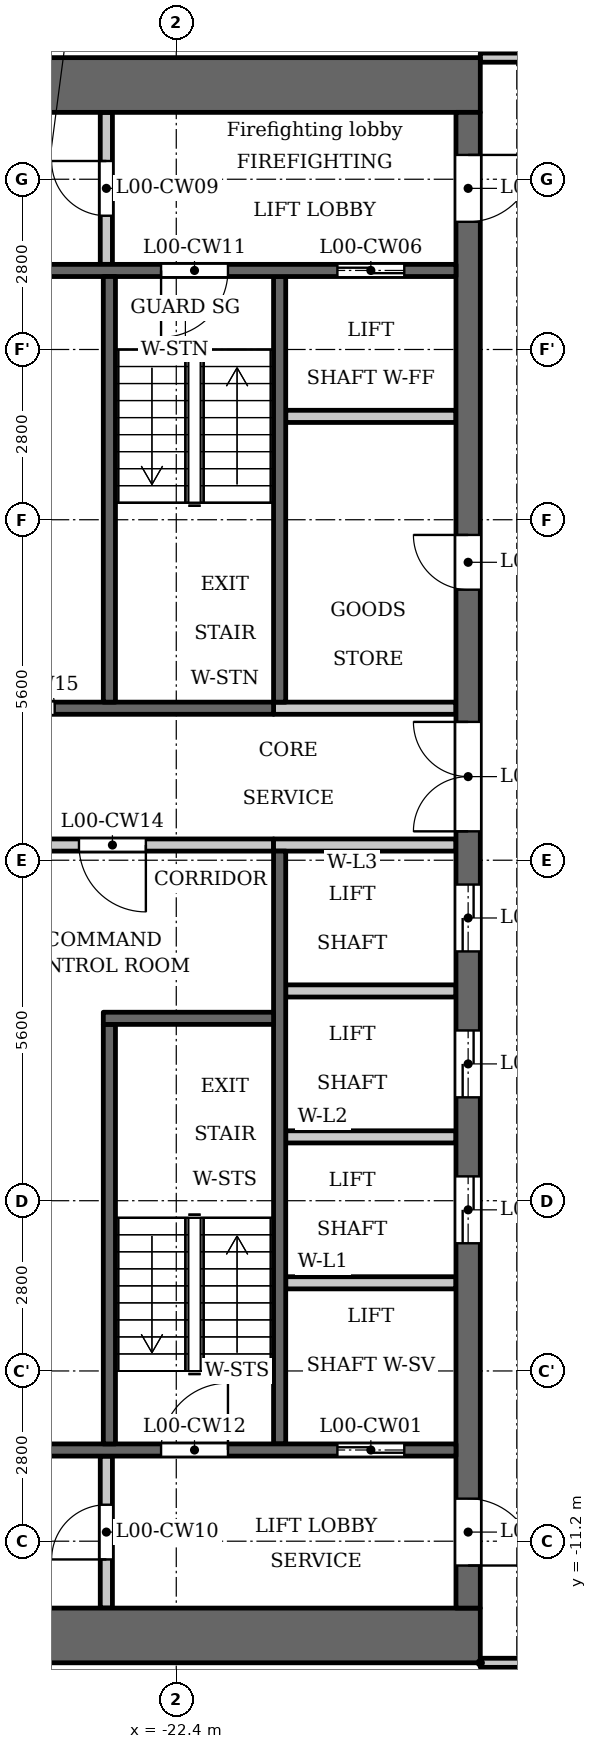
"""IFC4 building model, lengths in metres.
Left out: names, types, materials, properties, quantities, classifications, styles, units other than length and angle.
Written with IfcOpenShell. Run it as: python <this file> out.ifc"""

import sys

from ifc_helpers import new_model, si_unit, direction, frame, frame_2d, origin, place, context, subcontext, project, spatial, rectangle, extrude, element, fill, save


model = new_model("IFC4")
c1 = context("Model", 3, precision=1e-05, world=origin(), true_north=direction((0.0, 1.0)))
c2 = subcontext(c1, "Body", "Model", "MODEL_VIEW")
j1 = project(units=[si_unit("LENGTHUNIT", "METRE"), si_unit("PLANEANGLEUNIT", "RADIAN")], contexts=[c1])
p1 = place(None, origin())
s1 = spatial("IfcSite", under=j1, at=p1, CompositionType="ELEMENT")
p2 = place(p1, origin())
s2 = spatial("IfcBuilding", under=s1, at=p2, CompositionType="ELEMENT")
p3 = place(p2, origin())
s3 = spatial("IfcBuildingStorey", under=s2, at=p3, CompositionType="ELEMENT", Elevation=0.0)
p4 = place(p3, frame((-20.7, 2.6, 0.0), z_axis=(0.0, 0.0, 1.0), x_axis=(0.0, 1.0, 0.0)))
e1 = element("IfcWall", 1, at=p4, inside=s3, PredefinedType="SHEAR", context=c2, shape_type="SweptSolid", body=[
    extrude(rectangle(XDim=7.0, YDim=0.2, at=frame_2d((3.5, 0.0))), origin(), (0.0, 0.0, 1.0), 6.15),
])
p5 = place(p3, frame((-20.7, -9.6, 0.0), z_axis=(0.0, 0.0, 1.0), x_axis=(0.0, 1.0, 0.0)))
e2 = element("IfcWall", 2, at=p5, inside=s3, PredefinedType="SHEAR", context=c2, shape_type="SweptSolid", body=[
    extrude(rectangle(XDim=9.75, YDim=0.2, at=frame_2d((4.875, 0.0))), origin(), (0.0, 0.0, 1.0), 6.15),
])
p6 = place(p3, frame((-20.8, 2.5, 0.0), z_axis=(0.0, 0.0, 1.0), x_axis=(-1.0, 0.0, 0.0)))
e3 = element("IfcWall", 3, at=p6, inside=s3, PredefinedType="SHEAR", context=c2, shape_type="SweptSolid", body=[
    extrude(rectangle(XDim=5.3, YDim=0.2, at=frame_2d((2.65, 0.0))), origin(), (0.0, 0.0, 1.0), 6.15),
])
p7 = place(p6, frame((3.6, 0.0, 0.0)))
e4 = element("IfcOpeningElement", 4, at=p7, cuts=e3, PredefinedType="OPENING", context=c2, shape_type="SweptSolid", body=[
    extrude(rectangle(XDim=0.9, YDim=2.1, at=frame_2d((0.45, 1.05))), frame((0.0, 0.11, 0.0), z_axis=(0.0, -1.0, 0.0), x_axis=(1.0, 0.0, 0.0)), (0.0, 0.0, 1.0), 0.22),
])
p8 = place(p3, frame((-20.8, 0.25, 0.0), z_axis=(0.0, 0.0, 1.0), x_axis=(-1.0, 0.0, 0.0)))
e5 = element("IfcWall", 5, at=p8, inside=s3, PredefinedType="PARTITIONING", context=c2, shape_type="SweptSolid", body=[
    extrude(rectangle(XDim=5.3, YDim=0.2, at=frame_2d((2.65, 0.0))), origin(), (0.0, 0.0, 1.0), 6.15),
])
p9 = place(p8, frame((2.1, 0.0, 0.0)))
e6 = element("IfcOpeningElement", 6, at=p9, cuts=e5, PredefinedType="OPENING", context=c2, shape_type="SweptSolid", body=[
    extrude(rectangle(XDim=1.1, YDim=2.1, at=frame_2d((0.55, 1.05))), frame((0.0, 0.11, 0.0), z_axis=(0.0, -1.0, 0.0), x_axis=(1.0, 0.0, 0.0)), (0.0, 0.0, 1.0), 0.22),
])
for number, where, z_axis, x_axis in (
    (7, (-17.4, 12.75, 0.0), (0.0, 0.0, 1.0), (-1.0, 0.0, 0.0)),
    (8, (-17.4, -12.75, 0.0), (0.0, 0.0, 1.0), (-1.0, 0.0, 0.0)),
):
    element("IfcWall", number, at=place(p3, frame(where, z_axis=z_axis, x_axis=x_axis)), inside=s3, PredefinedType="SHEAR", context=c2, shape_type="SweptSolid", body=[
        extrude(rectangle(XDim=10.4, YDim=0.9, at=frame_2d((5.2, 0.0))), origin(), (0.0, 0.0, 1.0), 6.15),
    ])
p10 = place(p3, frame((-17.6, -12.3, 0.0), z_axis=(0.0, 0.0, 1.0), x_axis=(0.0, 1.0, 0.0)))
e9 = element("IfcWall", 9, at=p10, inside=s3, PredefinedType="SHEAR", context=c2, shape_type="SweptSolid", body=[
    extrude(rectangle(XDim=24.6, YDim=0.4, at=frame_2d((12.3, 0.0))), origin(), (0.0, 0.0, 1.0), 6.15),
])
p11 = place(p10, frame((6.0, 0.0, 0.0)))
e10 = element("IfcOpeningElement", 10, at=p11, cuts=e9, PredefinedType="OPENING", context=c2, shape_type="SweptSolid", body=[
    extrude(rectangle(XDim=1.1, YDim=2.1, at=frame_2d((0.55, 1.05))), frame((0.0, 0.21, 0.0), z_axis=(0.0, -1.0, 0.0), x_axis=(1.0, 0.0, 0.0)), (0.0, 0.0, 1.0), 0.42),
])
p12 = place(p10, frame((8.4, 0.0, 0.0)))
e11 = element("IfcOpeningElement", 11, at=p12, cuts=e9, PredefinedType="OPENING", context=c2, shape_type="SweptSolid", body=[
    extrude(rectangle(XDim=1.1, YDim=2.1, at=frame_2d((0.55, 1.05))), frame((0.0, 0.21, 0.0), z_axis=(0.0, -1.0, 0.0), x_axis=(1.0, 0.0, 0.0)), (0.0, 0.0, 1.0), 0.42),
])
p13 = place(p10, frame((10.8, 0.0, 0.0)))
e12 = element("IfcOpeningElement", 12, at=p13, cuts=e9, PredefinedType="OPENING", context=c2, shape_type="SweptSolid", body=[
    extrude(rectangle(XDim=1.1, YDim=2.1, at=frame_2d((0.55, 1.05))), frame((0.0, 0.21, 0.0), z_axis=(0.0, -1.0, 0.0), x_axis=(1.0, 0.0, 0.0)), (0.0, 0.0, 1.0), 0.42),
])
p14 = place(p10, frame((16.75, 0.0, 0.0)))
e13 = element("IfcOpeningElement", 13, at=p14, cuts=e9, PredefinedType="OPENING", context=c2, shape_type="SweptSolid", body=[
    extrude(rectangle(XDim=0.9, YDim=2.1, at=frame_2d((0.45, 1.05))), frame((0.0, 0.21, 0.0), z_axis=(0.0, -1.0, 0.0), x_axis=(1.0, 0.0, 0.0)), (0.0, 0.0, 1.0), 0.42),
])
p15 = place(p10, frame((22.8, 0.0, 0.0)))
e14 = element("IfcOpeningElement", 14, at=p15, cuts=e9, PredefinedType="OPENING", context=c2, shape_type="SweptSolid", body=[
    extrude(rectangle(XDim=1.1, YDim=2.1, at=frame_2d((0.55, 1.05))), frame((0.0, 0.21, 0.0), z_axis=(0.0, -1.0, 0.0), x_axis=(1.0, 0.0, 0.0)), (0.0, 0.0, 1.0), 0.42),
])
p16 = place(p10, frame((0.7, 0.0, 0.0)))
e15 = element("IfcOpeningElement", 15, at=p16, cuts=e9, PredefinedType="OPENING", context=c2, shape_type="SweptSolid", body=[
    extrude(rectangle(XDim=1.1, YDim=2.1, at=frame_2d((0.55, 1.05))), frame((0.0, 0.21, 0.0), z_axis=(0.0, -1.0, 0.0), x_axis=(1.0, 0.0, 0.0)), (0.0, 0.0, 1.0), 0.42),
])
p17 = place(p10, frame((12.775, 0.0, 0.0)))
e16 = element("IfcOpeningElement", 16, at=p17, cuts=e9, PredefinedType="OPENING", context=c2, shape_type="SweptSolid", body=[
    extrude(rectangle(XDim=1.8, YDim=2.1, at=frame_2d((0.9, 1.05))), frame((0.0, 0.21, 0.0), z_axis=(0.0, -1.0, 0.0), x_axis=(1.0, 0.0, 0.0)), (0.0, 0.0, 1.0), 0.42),
])
p18 = place(p3, frame((-23.55, 9.8, 0.0), z_axis=(0.0, 0.0, 1.0), x_axis=(0.0, 1.0, 0.0)))
e17 = element("IfcWall", 17, at=p18, inside=s3, PredefinedType="PARTITIONING", context=c2, shape_type="SweptSolid", body=[
    extrude(rectangle(XDim=2.5, YDim=0.2, at=frame_2d((1.25, 0.0))), origin(), (0.0, 0.0, 1.0), 6.15),
])
p19 = place(p18, frame((0.8, 0.0, 0.0)))
e18 = element("IfcOpeningElement", 18, at=p19, cuts=e17, PredefinedType="OPENING", context=c2, shape_type="SweptSolid", body=[
    extrude(rectangle(XDim=0.9, YDim=2.1, at=frame_2d((0.45, 1.05))), frame((0.0, 0.11, 0.0), z_axis=(0.0, -1.0, 0.0), x_axis=(1.0, 0.0, 0.0)), (0.0, 0.0, 1.0), 0.22),
])
p20 = place(p3, frame((-23.55, -12.3, 0.0), z_axis=(0.0, 0.0, 1.0), x_axis=(0.0, 1.0, 0.0)))
e19 = element("IfcWall", 19, at=p20, inside=s3, PredefinedType="PARTITIONING", context=c2, shape_type="SweptSolid", body=[
    extrude(rectangle(XDim=2.5, YDim=0.2, at=frame_2d((1.25, 0.0))), origin(), (0.0, 0.0, 1.0), 6.15),
])
p21 = place(p20, frame((0.8, 0.0, 0.0)))
e20 = element("IfcOpeningElement", 20, at=p21, cuts=e19, PredefinedType="OPENING", context=c2, shape_type="SweptSolid", body=[
    extrude(rectangle(XDim=0.9, YDim=2.1, at=frame_2d((0.45, 1.05))), frame((0.0, 0.11, 0.0), z_axis=(0.0, -1.0, 0.0), x_axis=(1.0, 0.0, 0.0)), (0.0, 0.0, 1.0), 0.22),
])
p22 = place(p3, frame((-17.8, -9.7, 0.0), z_axis=(0.0, 0.0, 1.0), x_axis=(-1.0, 0.0, 0.0)))
e21 = element("IfcWall", 21, at=p22, inside=s3, PredefinedType="SHEAR", context=c2, shape_type="SweptSolid", body=[
    extrude(rectangle(XDim=8.3, YDim=0.2, at=frame_2d((4.15, 0.0))), origin(), (0.0, 0.0, 1.0), 6.15),
])
p23 = place(p22, frame((0.85, 0.0, 0.0)))
e22 = element("IfcOpeningElement", 22, at=p23, cuts=e21, PredefinedType="OPENING", context=c2, shape_type="SweptSolid", body=[
    extrude(rectangle(XDim=1.1, YDim=2.1, at=frame_2d((0.55, 1.05))), frame((0.0, 0.11, 0.0), z_axis=(0.0, -1.0, 0.0), x_axis=(1.0, 0.0, 0.0)), (0.0, 0.0, 1.0), 0.22),
])
p24 = place(p22, frame((3.75, 0.0, 0.0)))
e23 = element("IfcOpeningElement", 23, at=p24, cuts=e21, PredefinedType="OPENING", context=c2, shape_type="SweptSolid", body=[
    extrude(rectangle(XDim=1.1, YDim=2.1, at=frame_2d((0.55, 1.05))), frame((0.0, 0.11, 0.0), z_axis=(0.0, -1.0, 0.0), x_axis=(1.0, 0.0, 0.0)), (0.0, 0.0, 1.0), 0.22),
])
for number, where, z_axis, x_axis in (
    (24, (-17.8, -6.95, 0.0), (0.0, 0.0, 1.0), (-1.0, 0.0, 0.0)),
    (25, (-17.8, -4.55, 0.0), (0.0, 0.0, 1.0), (-1.0, 0.0, 0.0)),
    (26, (-17.8, -2.15, 0.0), (0.0, 0.0, 1.0), (-1.0, 0.0, 0.0)),
):
    element("IfcWall", number, at=place(p3, frame(where, z_axis=z_axis, x_axis=x_axis)), inside=s3, PredefinedType="PARTITIONING", context=c2, shape_type="SweptSolid", body=[
        extrude(rectangle(XDim=2.8, YDim=0.2, at=frame_2d((1.4, 0.0))), origin(), (0.0, 0.0, 1.0), 6.15),
    ])
for number, where, z_axis, x_axis in (
    (27, (-17.8, 0.25, 0.0), (0.0, 0.0, 1.0), (-1.0, 0.0, 0.0)),
    (28, (-17.8, 2.5, 0.0), (0.0, 0.0, 1.0), (-1.0, 0.0, 0.0)),
):
    element("IfcWall", number, at=place(p3, frame(where, z_axis=z_axis, x_axis=x_axis)), inside=s3, PredefinedType="PARTITIONING", context=c2, shape_type="SweptSolid", body=[
        extrude(rectangle(XDim=3.0, YDim=0.2, at=frame_2d((1.5, 0.0))), origin(), (0.0, 0.0, 1.0), 6.15),
    ])
p25 = place(p3, frame((-17.8, 7.3, 0.0), z_axis=(0.0, 0.0, 1.0), x_axis=(-1.0, 0.0, 0.0)))
e29 = element("IfcWall", 29, at=p25, inside=s3, PredefinedType="PARTITIONING", context=c2, shape_type="SweptSolid", body=[
    extrude(rectangle(XDim=2.8, YDim=0.2, at=frame_2d((1.4, 0.0))), origin(), (0.0, 0.0, 1.0), 6.15),
])
p26 = place(p3, frame((-17.8, 9.7, 0.0), z_axis=(0.0, 0.0, 1.0), x_axis=(-1.0, 0.0, 0.0)))
e30 = element("IfcWall", 30, at=p26, inside=s3, PredefinedType="SHEAR", context=c2, shape_type="SweptSolid", body=[
    extrude(rectangle(XDim=8.3, YDim=0.2, at=frame_2d((4.15, 0.0))), origin(), (0.0, 0.0, 1.0), 6.15),
])
p27 = place(p26, frame((0.85, 0.0, 0.0)))
e31 = element("IfcOpeningElement", 31, at=p27, cuts=e30, PredefinedType="OPENING", context=c2, shape_type="SweptSolid", body=[
    extrude(rectangle(XDim=1.1, YDim=2.1, at=frame_2d((0.55, 1.05))), frame((0.0, 0.11, 0.0), z_axis=(0.0, -1.0, 0.0), x_axis=(1.0, 0.0, 0.0)), (0.0, 0.0, 1.0), 0.22),
])
p28 = place(p26, frame((3.75, 0.0, 0.0)))
e32 = element("IfcOpeningElement", 32, at=p28, cuts=e30, PredefinedType="OPENING", context=c2, shape_type="SweptSolid", body=[
    extrude(rectangle(XDim=1.1, YDim=2.1, at=frame_2d((0.55, 1.05))), frame((0.0, 0.11, 0.0), z_axis=(0.0, -1.0, 0.0), x_axis=(1.0, 0.0, 0.0)), (0.0, 0.0, 1.0), 0.22),
])
p29 = place(p3, frame((-23.5, 2.6, 0.0), z_axis=(0.0, 0.0, 1.0), x_axis=(0.0, 1.0, 0.0)))
e33 = element("IfcWall", 33, at=p29, inside=s3, PredefinedType="SHEAR", context=c2, shape_type="SweptSolid", body=[
    extrude(rectangle(XDim=7.0, YDim=0.2, at=frame_2d((3.5, 0.0))), origin(), (0.0, 0.0, 1.0), 6.15),
])
p30 = place(p3, frame((-23.5, -9.6, 0.0), z_axis=(0.0, 0.0, 1.0), x_axis=(0.0, 1.0, 0.0)))
e34 = element("IfcWall", 34, at=p30, inside=s3, PredefinedType="SHEAR", context=c2, shape_type="SweptSolid", body=[
    extrude(rectangle(XDim=6.9, YDim=0.2, at=frame_2d((3.45, 0.0))), origin(), (0.0, 0.0, 1.0), 6.15),
])
p31 = place(p3, frame((-20.8, -2.6, 0.0), z_axis=(0.0, 0.0, 1.0), x_axis=(-1.0, 0.0, 0.0)))
e35 = element("IfcWall", 35, at=p31, inside=s3, PredefinedType="SHEAR", context=c2, shape_type="SweptSolid", body=[
    extrude(rectangle(XDim=2.8, YDim=0.2, at=frame_2d((1.4, 0.0))), origin(), (0.0, 0.0, 1.0), 6.15),
])
p32 = place(p3, frame((-17.4, -13.2, 0.0), z_axis=(0.0, 0.0, 1.0), x_axis=(1.0, 0.0, 0.0)))
e36 = element("IfcWall", 36, at=p32, inside=s3, PredefinedType="PARTITIONING", context=c2, shape_type="SweptSolid", body=[
    extrude(rectangle(XDim=34.8, YDim=0.15, at=frame_2d((17.4, 0.0))), origin(), (0.0, 0.0, 1.0), 6.15),
])
p33 = place(p32, frame((13.95, 0.0, 0.0)))
e37 = element("IfcOpeningElement", 37, at=p33, cuts=e36, PredefinedType="OPENING", context=c2, shape_type="SweptSolid", body=[
    extrude(rectangle(XDim=1.8, YDim=2.1, at=frame_2d((0.9, 1.05))), frame((0.0, 0.085, 0.0), z_axis=(0.0, -1.0, 0.0), x_axis=(1.0, 0.0, 0.0)), (0.0, 0.0, 1.0), 0.17),
])
p34 = place(p32, frame((33.05, 0.0, 0.0)))
e38 = element("IfcOpeningElement", 38, at=p34, cuts=e36, PredefinedType="OPENING", context=c2, shape_type="SweptSolid", body=[
    extrude(rectangle(XDim=1.2, YDim=2.1, at=frame_2d((0.6, 1.05))), frame((0.0, 0.085, 0.0), z_axis=(0.0, -1.0, 0.0), x_axis=(1.0, 0.0, 0.0)), (0.0, 0.0, 1.0), 0.17),
])
p35 = place(p32, frame((0.65, 0.0, 0.0)))
e39 = element("IfcOpeningElement", 39, at=p35, cuts=e36, PredefinedType="OPENING", context=c2, shape_type="SweptSolid", body=[
    extrude(rectangle(XDim=1.2, YDim=2.1, at=frame_2d((0.6, 1.05))), frame((0.0, 0.085, 0.0), z_axis=(0.0, -1.0, 0.0), x_axis=(1.0, 0.0, 0.0)), (0.0, 0.0, 1.0), 0.17),
])
p36 = place(p3, frame((-17.4, 13.2, 0.0), z_axis=(0.0, 0.0, 1.0), x_axis=(1.0, 0.0, 0.0)))
e40 = element("IfcWall", 40, at=p36, inside=s3, PredefinedType="PARTITIONING", context=c2, shape_type="SweptSolid", body=[
    extrude(rectangle(XDim=34.8, YDim=0.15, at=frame_2d((17.4, 0.0))), origin(), (0.0, 0.0, 1.0), 6.15),
])
p37 = place(p36, frame((3.05, 0.0, 0.0)))
e41 = element("IfcOpeningElement", 41, at=p37, cuts=e40, PredefinedType="OPENING", context=c2, shape_type="SweptSolid", body=[
    extrude(rectangle(XDim=1.8, YDim=2.1, at=frame_2d((0.9, 1.05))), frame((0.0, 0.085, 0.0), z_axis=(0.0, -1.0, 0.0), x_axis=(1.0, 0.0, 0.0)), (0.0, 0.0, 1.0), 0.17),
])
p38 = place(p36, frame((0.75, 0.0, 0.0)))
e42 = element("IfcOpeningElement", 42, at=p38, cuts=e40, PredefinedType="OPENING", context=c2, shape_type="SweptSolid", body=[
    extrude(rectangle(XDim=1.0, YDim=2.1, at=frame_2d((0.5, 1.05))), frame((0.0, 0.085, 0.0), z_axis=(0.0, -1.0, 0.0), x_axis=(1.0, 0.0, 0.0)), (0.0, 0.0, 1.0), 0.17),
])
p39 = place(p36, frame((33.15, 0.0, 0.0)))
e43 = element("IfcOpeningElement", 43, at=p39, cuts=e40, PredefinedType="OPENING", context=c2, shape_type="SweptSolid", body=[
    extrude(rectangle(XDim=1.0, YDim=2.1, at=frame_2d((0.5, 1.05))), frame((0.0, 0.085, 0.0), z_axis=(0.0, -1.0, 0.0), x_axis=(1.0, 0.0, 0.0)), (0.0, 0.0, 1.0), 0.17),
])
p40 = place(p23, origin())
e44 = element("IfcDoor", 44, at=p40, inside=s3, OperationType="DOUBLE_DOOR_SLIDING", PredefinedType="DOOR", context=c2, shape_type="SweptSolid", body=[
    extrude(rectangle(XDim=1.1, YDim=2.1, at=frame_2d((0.55, 1.05))), frame((0.0, 0.025, 0.0), z_axis=(0.0, -1.0, 0.0), x_axis=(1.0, 0.0, 0.0)), (0.0, 0.0, 1.0), 0.05),
])
fill(e22, e44)
p41 = place(p11, origin())
e45 = element("IfcDoor", 45, at=p41, inside=s3, OperationType="DOUBLE_DOOR_SLIDING", PredefinedType="DOOR", context=c2, shape_type="SweptSolid", body=[
    extrude(rectangle(XDim=1.1, YDim=2.1, at=frame_2d((0.55, 1.05))), frame((0.0, 0.025, 0.0), z_axis=(0.0, -1.0, 0.0), x_axis=(1.0, 0.0, 0.0)), (0.0, 0.0, 1.0), 0.05),
])
fill(e10, e45)
p42 = place(p12, origin())
e46 = element("IfcDoor", 46, at=p42, inside=s3, OperationType="DOUBLE_DOOR_SLIDING", PredefinedType="DOOR", context=c2, shape_type="SweptSolid", body=[
    extrude(rectangle(XDim=1.1, YDim=2.1, at=frame_2d((0.55, 1.05))), frame((0.0, 0.025, 0.0), z_axis=(0.0, -1.0, 0.0), x_axis=(1.0, 0.0, 0.0)), (0.0, 0.0, 1.0), 0.05),
])
fill(e11, e46)
p43 = place(p13, origin())
e47 = element("IfcDoor", 47, at=p43, inside=s3, OperationType="DOUBLE_DOOR_SLIDING", PredefinedType="DOOR", context=c2, shape_type="SweptSolid", body=[
    extrude(rectangle(XDim=1.1, YDim=2.1, at=frame_2d((0.55, 1.05))), frame((0.0, 0.025, 0.0), z_axis=(0.0, -1.0, 0.0), x_axis=(1.0, 0.0, 0.0)), (0.0, 0.0, 1.0), 0.05),
])
fill(e12, e47)
p44 = place(p14, origin())
e48 = element("IfcDoor", 48, at=p44, inside=s3, OperationType="SINGLE_SWING_LEFT", PredefinedType="DOOR", context=c2, shape_type="SweptSolid", body=[
    extrude(rectangle(XDim=0.9, YDim=2.1, at=frame_2d((0.45, 1.05))), frame((0.0, 0.025, 0.0), z_axis=(0.0, -1.0, 0.0), x_axis=(1.0, 0.0, 0.0)), (0.0, 0.0, 1.0), 0.05),
])
fill(e13, e48)
p45 = place(p27, origin())
e49 = element("IfcDoor", 49, at=p45, inside=s3, OperationType="DOUBLE_DOOR_SLIDING", PredefinedType="DOOR", context=c2, shape_type="SweptSolid", body=[
    extrude(rectangle(XDim=1.1, YDim=2.1, at=frame_2d((0.55, 1.05))), frame((0.0, 0.025, 0.0), z_axis=(0.0, -1.0, 0.0), x_axis=(1.0, 0.0, 0.0)), (0.0, 0.0, 1.0), 0.05),
])
fill(e31, e49)
p46 = place(p15, origin())
e50 = element("IfcDoor", 50, at=p46, inside=s3, OperationType="SINGLE_SWING_RIGHT", PredefinedType="DOOR", context=c2, shape_type="SweptSolid", body=[
    extrude(rectangle(XDim=1.1, YDim=2.1, at=frame_2d((0.55, 1.05))), frame((0.0, 0.025, 0.0), z_axis=(0.0, -1.0, 0.0), x_axis=(1.0, 0.0, 0.0)), (0.0, 0.0, 1.0), 0.05),
])
fill(e14, e50)
p47 = place(p16, origin())
e51 = element("IfcDoor", 51, at=p47, inside=s3, OperationType="SINGLE_SWING_LEFT", PredefinedType="DOOR", context=c2, shape_type="SweptSolid", body=[
    extrude(rectangle(XDim=1.1, YDim=2.1, at=frame_2d((0.55, 1.05))), frame((0.0, 0.025, 0.0), z_axis=(0.0, -1.0, 0.0), x_axis=(1.0, 0.0, 0.0)), (0.0, 0.0, 1.0), 0.05),
])
fill(e15, e51)
p48 = place(p19, origin())
e52 = element("IfcDoor", 52, at=p48, inside=s3, OperationType="SINGLE_SWING_LEFT", PredefinedType="DOOR", context=c2, shape_type="SweptSolid", body=[
    extrude(rectangle(XDim=0.9, YDim=2.1, at=frame_2d((0.45, 1.05))), frame((0.0, 0.025, 0.0), z_axis=(0.0, -1.0, 0.0), x_axis=(1.0, 0.0, 0.0)), (0.0, 0.0, 1.0), 0.05),
])
fill(e18, e52)
p49 = place(p21, origin())
e53 = element("IfcDoor", 53, at=p49, inside=s3, OperationType="SINGLE_SWING_RIGHT", PredefinedType="DOOR", context=c2, shape_type="SweptSolid", body=[
    extrude(rectangle(XDim=0.9, YDim=2.1, at=frame_2d((0.45, 1.05))), frame((0.0, 0.025, 0.0), z_axis=(0.0, -1.0, 0.0), x_axis=(1.0, 0.0, 0.0)), (0.0, 0.0, 1.0), 0.05),
])
fill(e20, e53)
p50 = place(p28, origin())
e54 = element("IfcDoor", 54, at=p50, inside=s3, OperationType="SINGLE_SWING_LEFT", PredefinedType="DOOR", context=c2, shape_type="SweptSolid", body=[
    extrude(rectangle(XDim=1.1, YDim=2.1, at=frame_2d((0.55, 1.05))), frame((0.0, 0.025, 0.0), z_axis=(0.0, -1.0, 0.0), x_axis=(1.0, 0.0, 0.0)), (0.0, 0.0, 1.0), 0.05),
])
fill(e32, e54)
p51 = place(p24, origin())
e55 = element("IfcDoor", 55, at=p51, inside=s3, OperationType="SINGLE_SWING_LEFT", PredefinedType="DOOR", context=c2, shape_type="SweptSolid", body=[
    extrude(rectangle(XDim=1.1, YDim=2.1, at=frame_2d((0.55, 1.05))), frame((0.0, 0.025, 0.0), z_axis=(0.0, -1.0, 0.0), x_axis=(1.0, 0.0, 0.0)), (0.0, 0.0, 1.0), 0.05),
])
fill(e23, e55)
p52 = place(p17, origin())
e56 = element("IfcDoor", 56, at=p52, inside=s3, OperationType="DOUBLE_DOOR_SINGLE_SWING", PredefinedType="DOOR", context=c2, shape_type="SweptSolid", body=[
    extrude(rectangle(XDim=1.8, YDim=2.1, at=frame_2d((0.9, 1.05))), frame((0.0, 0.025, 0.0), z_axis=(0.0, -1.0, 0.0), x_axis=(1.0, 0.0, 0.0)), (0.0, 0.0, 1.0), 0.05),
])
fill(e16, e56)
p53 = place(p9, origin())
e57 = element("IfcDoor", 57, at=p53, inside=s3, OperationType="SINGLE_SWING_RIGHT", PredefinedType="DOOR", context=c2, shape_type="SweptSolid", body=[
    extrude(rectangle(XDim=1.1, YDim=2.1, at=frame_2d((0.55, 1.05))), frame((0.0, 0.025, 0.0), z_axis=(0.0, -1.0, 0.0), x_axis=(1.0, 0.0, 0.0)), (0.0, 0.0, 1.0), 0.05),
])
fill(e6, e57)
p54 = place(p7, origin())
e58 = element("IfcDoor", 58, at=p54, inside=s3, OperationType="SINGLE_SWING_RIGHT", PredefinedType="DOOR", context=c2, shape_type="SweptSolid", body=[
    extrude(rectangle(XDim=0.9, YDim=2.1, at=frame_2d((0.45, 1.05))), frame((0.0, 0.025, 0.0), z_axis=(0.0, -1.0, 0.0), x_axis=(1.0, 0.0, 0.0)), (0.0, 0.0, 1.0), 0.05),
])
fill(e4, e58)
save(model, sys.argv[1])
